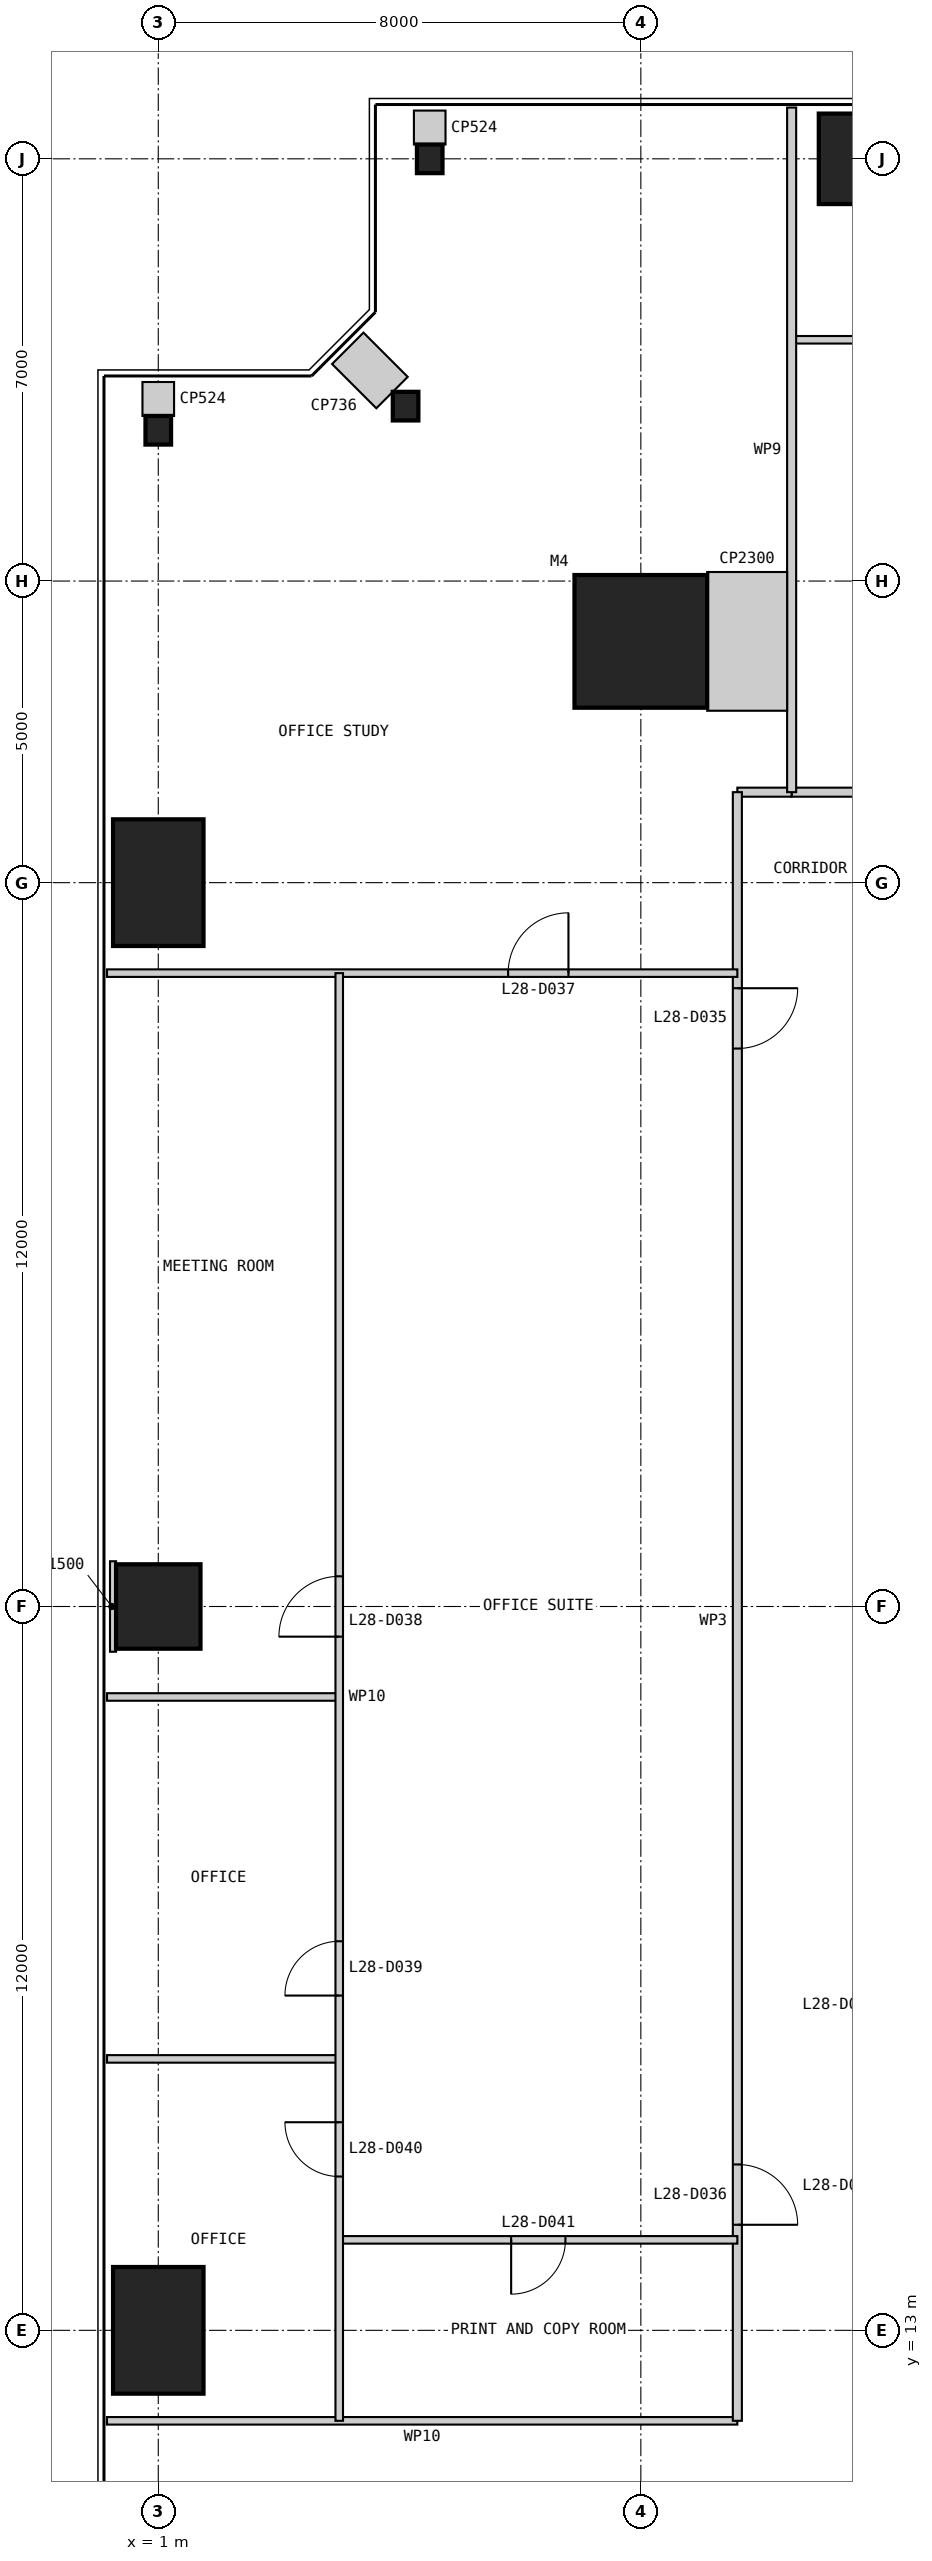
"""IFC4 building model, lengths in metres.
Left out: names, types, materials, properties, quantities, classifications, styles, units other than length and angle.
Written with IfcOpenShell. Run it as: python <this file> out.ifc"""

import sys

from ifc_helpers import new_model, si_unit, direction, frame, frame_2d, origin, origin_2d, place, context, subcontext, project, spatial, rectangle, i_section, extrude, element, fill, save


model = new_model("IFC4")
c1 = context("Model", 3, precision=1e-05, world=origin(), true_north=direction((0.0, 1.0)))
c2 = subcontext(c1, "Body", "Model", "MODEL_VIEW")
j1 = project(units=[si_unit("LENGTHUNIT", "METRE"), si_unit("PLANEANGLEUNIT", "RADIAN")], contexts=[c1])
p1 = place(None, origin())
s1 = spatial("IfcSite", under=j1, at=p1, CompositionType="ELEMENT")
p2 = place(p1, origin())
s2 = spatial("IfcBuilding", under=s1, at=p2, CompositionType="ELEMENT")
p3 = place(p2, frame((0.0, 0.0, 122.4)))
s3 = spatial("IfcBuildingStorey", under=s2, at=p3, CompositionType="ELEMENT", Elevation=122.4)
p4 = place(p3, frame((9.0, 41.0, 0.0), z_axis=(0.0, 0.0, 1.0), x_axis=(1.0, 0.0, 0.0)))
e1 = element("IfcColumn", 1, at=p4, inside=s3, PredefinedType="COLUMN", context=c2, shape_type="SweptSolid", body=[
    extrude(rectangle(XDim=2.2, YDim=2.2, at=origin_2d()), origin(), (0.0, 0.0, 1.0), 4.0),
])
p5 = place(p3, frame((13.0, 49.0, 0.0), z_axis=(0.0, 0.0, 1.0), x_axis=(1.0, 0.0, 0.0)))
e2 = element("IfcColumn", 2, at=p5, inside=s3, PredefinedType="COLUMN", context=c2, shape_type="SweptSolid", body=[
    extrude(rectangle(XDim=2.1, YDim=1.5, at=origin_2d()), origin(), (0.0, 0.0, 1.0), 4.0),
])
for number, where, z_axis, x_axis in (
    (3, (5.5, 49.0, 0.0), (0.0, 0.0, 1.0), (1.0, 0.0, 0.0)),
    (4, (5.1, 44.9, 0.0), (0.0, 0.0, 1.0), (1.0, 0.0, 0.0)),
    (5, (1.0, 44.5, 0.0), (0.0, 0.0, 1.0), (1.0, 0.0, 0.0)),
):
    element("IfcColumn", number, at=place(p3, frame(where, z_axis=z_axis, x_axis=x_axis)), inside=s3, PredefinedType="COLUMN", context=c2, shape_type="SweptSolid", body=[
        extrude(i_section(OverallWidth=0.424, OverallDepth=0.475, WebThickness=0.048, FlangeThickness=0.077, at=origin_2d()), origin(), (0.0, 0.0, 1.0), 4.0),
    ])
p6 = place(p3, frame((1.0, 37.0, 0.0), z_axis=(0.0, 0.0, 1.0), x_axis=(1.0, 0.0, 0.0)))
e6 = element("IfcColumn", 6, at=p6, inside=s3, PredefinedType="COLUMN", context=c2, shape_type="SweptSolid", body=[
    extrude(rectangle(XDim=1.5, YDim=2.1, at=origin_2d()), origin(), (0.0, 0.0, 1.0), 4.0),
])
p7 = place(p3, frame((1.0, 25.0, 0.0), z_axis=(0.0, 0.0, 1.0), x_axis=(1.0, 0.0, 0.0)))
e7 = element("IfcColumn", 7, at=p7, inside=s3, PredefinedType="COLUMN", context=c2, shape_type="SweptSolid", body=[
    extrude(rectangle(XDim=1.4, YDim=1.4, at=origin_2d()), origin(), (0.0, 0.0, 1.0), 4.0),
])
p8 = place(p3, frame((1.0, 13.0, 0.0), z_axis=(0.0, 0.0, 1.0), x_axis=(1.0, 0.0, 0.0)))
e8 = element("IfcColumn", 8, at=p8, inside=s3, PredefinedType="COLUMN", context=c2, shape_type="SweptSolid", body=[
    extrude(rectangle(XDim=1.5, YDim=2.1, at=origin_2d()), origin(), (0.0, 0.0, 1.0), 4.0),
])
p9 = place(p3, frame((0.15, 11.5, 0.0), z_axis=(0.0, 0.0, 1.0), x_axis=(1.0, 0.0, 0.0)))
e9 = element("IfcWall", 9, at=p9, inside=s3, PredefinedType="PARTITIONING", context=c2, shape_type="SweptSolid", body=[
    extrude(rectangle(XDim=10.45, YDim=0.125, at=frame_2d((5.225, 0.0))), origin(), (0.0, 0.0, 1.0), 3.85),
])
p10 = place(p3, frame((38.5, 38.5, 0.0), z_axis=(0.0, 0.0, 1.0), x_axis=(-1.0, 0.0, 0.0)))
e10 = element("IfcWall", 10, at=p10, inside=s3, PredefinedType="PARTITIONING", context=c2, shape_type="SweptSolid", body=[
    extrude(rectangle(XDim=27.0, YDim=0.15, at=frame_2d((13.5, 0.0))), origin(), (0.0, 0.0, 1.0), 3.85),
])
p11 = place(p10, frame((2.5, 0.0, 0.0)))
e11 = element("IfcOpeningElement", 11, at=p11, cuts=e10, PredefinedType="OPENING", context=c2, shape_type="SweptSolid", body=[
    extrude(rectangle(XDim=1.0, YDim=2.2, at=frame_2d((0.5, 1.1))), frame((0.0, 0.085, 0.0), z_axis=(0.0, -1.0, 0.0), x_axis=(1.0, 0.0, 0.0)), (0.0, 0.0, 1.0), 0.17),
])
p12 = place(p10, frame((16.0, 0.0, 0.0)))
e12 = element("IfcOpeningElement", 12, at=p12, cuts=e10, PredefinedType="OPENING", context=c2, shape_type="SweptSolid", body=[
    extrude(rectangle(XDim=1.0, YDim=2.2, at=frame_2d((0.5, 1.1))), frame((0.0, 0.085, 0.0), z_axis=(0.0, -1.0, 0.0), x_axis=(1.0, 0.0, 0.0)), (0.0, 0.0, 1.0), 0.17),
])
p13 = place(p3, frame((17.5, 46.0, 0.0), z_axis=(0.0, 0.0, 1.0), x_axis=(-1.0, 0.0, 0.0)))
e13 = element("IfcWall", 13, at=p13, inside=s3, PredefinedType="PARTITIONING", context=c2, shape_type="SweptSolid", body=[
    extrude(rectangle(XDim=6.0, YDim=0.125, at=frame_2d((3.0, 0.0))), origin(), (0.0, 0.0, 1.0), 3.85),
])
p14 = place(p3, frame((11.5, 38.5, 0.0), z_axis=(0.0, 0.0, 1.0), x_axis=(-1.0, 0.0, 0.0)))
e14 = element("IfcWall", 14, at=p14, inside=s3, PredefinedType="PARTITIONING", context=c2, shape_type="SweptSolid", body=[
    extrude(rectangle(XDim=0.9, YDim=0.15, at=frame_2d((0.45, 0.0))), origin(), (0.0, 0.0, 1.0), 3.85),
])
p15 = place(p3, frame((10.6, 38.5, 0.0), z_axis=(0.0, 0.0, 1.0), x_axis=(0.0, -1.0, 0.0)))
e15 = element("IfcWall", 15, at=p15, inside=s3, PredefinedType="PARTITIONING", context=c2, shape_type="SweptSolid", body=[
    extrude(rectangle(XDim=27.0, YDim=0.15, at=frame_2d((13.5, 0.0))), origin(), (0.0, 0.0, 1.0), 3.85),
])
p16 = place(p15, frame((3.25, 0.0, 0.0)))
e16 = element("IfcOpeningElement", 16, at=p16, cuts=e15, PredefinedType="OPENING", context=c2, shape_type="SweptSolid", body=[
    extrude(rectangle(XDim=1.0, YDim=2.2, at=frame_2d((0.5, 1.1))), frame((0.0, 0.085, 0.0), z_axis=(0.0, -1.0, 0.0), x_axis=(1.0, 0.0, 0.0)), (0.0, 0.0, 1.0), 0.17),
])
p17 = place(p15, frame((22.75, 0.0, 0.0)))
e17 = element("IfcOpeningElement", 17, at=p17, cuts=e15, PredefinedType="OPENING", context=c2, shape_type="SweptSolid", body=[
    extrude(rectangle(XDim=1.0, YDim=2.2, at=frame_2d((0.5, 1.1))), frame((0.0, 0.085, 0.0), z_axis=(0.0, -1.0, 0.0), x_axis=(1.0, 0.0, 0.0)), (0.0, 0.0, 1.0), 0.17),
])
p18 = place(p3, frame((11.5, 49.85, 0.0), z_axis=(0.0, 0.0, 1.0), x_axis=(0.0, -1.0, 0.0)))
e18 = element("IfcWall", 18, at=p18, inside=s3, PredefinedType="PARTITIONING", context=c2, shape_type="SweptSolid", body=[
    extrude(rectangle(XDim=11.35, YDim=0.15, at=frame_2d((5.675, 0.0))), origin(), (0.0, 0.0, 1.0), 3.85),
])
p19 = place(p3, frame((0.15, 35.5, 0.0), z_axis=(0.0, 0.0, 1.0), x_axis=(1.0, 0.0, 0.0)))
e19 = element("IfcWall", 19, at=p19, inside=s3, PredefinedType="PARTITIONING", context=c2, shape_type="SweptSolid", body=[
    extrude(rectangle(XDim=10.45, YDim=0.125, at=frame_2d((5.225, 0.0))), origin(), (0.0, 0.0, 1.0), 3.85),
])
p20 = place(p19, frame((6.65, 0.0, 0.0)))
e20 = element("IfcOpeningElement", 20, at=p20, cuts=e19, PredefinedType="OPENING", context=c2, shape_type="SweptSolid", body=[
    extrude(rectangle(XDim=1.0, YDim=2.2, at=frame_2d((0.5, 1.1))), frame((0.0, 0.073, 0.0), z_axis=(0.0, -1.0, 0.0), x_axis=(1.0, 0.0, 0.0)), (0.0, 0.0, 1.0), 0.145),
])
for number, where, z_axis, x_axis in (
    (21, (0.15, 23.5, 0.0), (0.0, 0.0, 1.0), (1.0, 0.0, 0.0)),
    (22, (0.15, 17.5, 0.0), (0.0, 0.0, 1.0), (1.0, 0.0, 0.0)),
):
    element("IfcWall", number, at=place(p3, frame(where, z_axis=z_axis, x_axis=x_axis)), inside=s3, PredefinedType="PARTITIONING", context=c2, shape_type="SweptSolid", body=[
        extrude(rectangle(XDim=3.85, YDim=0.125, at=frame_2d((1.925, 0.0))), origin(), (0.0, 0.0, 1.0), 3.85),
    ])
p21 = place(p3, frame((4.0, 14.5, 0.0), z_axis=(0.0, 0.0, 1.0), x_axis=(1.0, 0.0, 0.0)))
e23 = element("IfcWall", 23, at=p21, inside=s3, PredefinedType="PARTITIONING", context=c2, shape_type="SweptSolid", body=[
    extrude(rectangle(XDim=6.6, YDim=0.125, at=frame_2d((3.3, 0.0))), origin(), (0.0, 0.0, 1.0), 3.85),
])
p22 = place(p21, frame((2.85, 0.0, 0.0)))
e24 = element("IfcOpeningElement", 24, at=p22, cuts=e23, PredefinedType="OPENING", context=c2, shape_type="SweptSolid", body=[
    extrude(rectangle(XDim=0.9, YDim=2.2, at=frame_2d((0.45, 1.1))), frame((0.0, 0.073, 0.0), z_axis=(0.0, -1.0, 0.0), x_axis=(1.0, 0.0, 0.0)), (0.0, 0.0, 1.0), 0.145),
])
p23 = place(p3, frame((4.0, 35.5, 0.0), z_axis=(0.0, 0.0, 1.0), x_axis=(0.0, -1.0, 0.0)))
e25 = element("IfcWall", 25, at=p23, inside=s3, PredefinedType="PARTITIONING", context=c2, shape_type="SweptSolid", body=[
    extrude(rectangle(XDim=24.0, YDim=0.125, at=frame_2d((12.0, 0.0))), origin(), (0.0, 0.0, 1.0), 3.238),
])
p24 = place(p23, frame((10.0, 0.0, 0.0)))
e26 = element("IfcOpeningElement", 26, at=p24, cuts=e25, PredefinedType="OPENING", context=c2, shape_type="SweptSolid", body=[
    extrude(rectangle(XDim=1.0, YDim=2.2, at=frame_2d((0.5, 1.1))), frame((0.0, 0.073, 0.0), z_axis=(0.0, -1.0, 0.0), x_axis=(1.0, 0.0, 0.0)), (0.0, 0.0, 1.0), 0.145),
])
p25 = place(p23, frame((16.05, 0.0, 0.0)))
e27 = element("IfcOpeningElement", 27, at=p25, cuts=e25, PredefinedType="OPENING", context=c2, shape_type="SweptSolid", body=[
    extrude(rectangle(XDim=0.9, YDim=2.2, at=frame_2d((0.45, 1.1))), frame((0.0, 0.073, 0.0), z_axis=(0.0, -1.0, 0.0), x_axis=(1.0, 0.0, 0.0)), (0.0, 0.0, 1.0), 0.145),
])
p26 = place(p23, frame((19.05, 0.0, 0.0)))
e28 = element("IfcOpeningElement", 28, at=p26, cuts=e25, PredefinedType="OPENING", context=c2, shape_type="SweptSolid", body=[
    extrude(rectangle(XDim=0.9, YDim=2.2, at=frame_2d((0.45, 1.1))), frame((0.0, 0.073, 0.0), z_axis=(0.0, -1.0, 0.0), x_axis=(1.0, 0.0, 0.0)), (0.0, 0.0, 1.0), 0.145),
])
p27 = place(p3, frame((11.425, 41.0, 0.0), z_axis=(0.0, 0.0, 1.0), x_axis=(-1.0, 0.0, 0.0)))
e29 = element("IfcWall", 29, at=p27, inside=s3, PredefinedType="PARTITIONING", context=c2, shape_type="SweptSolid", body=[
    extrude(rectangle(XDim=1.325, YDim=2.3, at=frame_2d((0.663, 0.0))), origin(), (0.0, 0.0, 1.0), 3.85),
])
p28 = place(p3, frame((5.5, 49.8, 0.0), z_axis=(0.0, 0.0, 1.0), x_axis=(0.0, -1.0, 0.0)))
e30 = element("IfcWall", 30, at=p28, inside=s3, PredefinedType="PARTITIONING", context=c2, shape_type="SweptSolid", body=[
    extrude(rectangle(XDim=0.562, YDim=0.524, at=frame_2d((0.281, 0.0))), origin(), (0.0, 0.0, 1.0), 3.85),
])
p29 = place(p3, frame((4.141, 45.859, 0.0), z_axis=(0.0, 0.0, 1.0), x_axis=(0.707106781187, -0.707106781187, 0.0)))
e31 = element("IfcWall", 31, at=p29, inside=s3, PredefinedType="PARTITIONING", context=c2, shape_type="SweptSolid", body=[
    extrude(rectangle(XDim=1.038, YDim=0.736, at=frame_2d((0.519, 0.0))), origin(), (0.0, 0.0, 1.0), 3.85),
])
p30 = place(p3, frame((1.0, 45.3, 0.0), z_axis=(0.0, 0.0, 1.0), x_axis=(0.0, -1.0, 0.0)))
e32 = element("IfcWall", 32, at=p30, inside=s3, PredefinedType="PARTITIONING", context=c2, shape_type="SweptSolid", body=[
    extrude(rectangle(XDim=0.562, YDim=0.524, at=frame_2d((0.281, 0.0))), origin(), (0.0, 0.0, 1.0), 3.85),
])
p31 = place(p3, frame((0.2, 25.0, 0.0), z_axis=(0.0, 0.0, 1.0), x_axis=(1.0, 0.0, 0.0)))
e33 = element("IfcWall", 33, at=p31, inside=s3, PredefinedType="PARTITIONING", context=c2, shape_type="SweptSolid", body=[
    extrude(rectangle(XDim=0.1, YDim=1.5, at=frame_2d((0.05, 0.0))), origin(), (0.0, 0.0, 1.0), 3.85),
])
p32 = place(p16, origin())
e34 = element("IfcDoor", 34, at=p32, inside=s3, OperationType="SINGLE_SWING_LEFT", PredefinedType="DOOR", context=c2, shape_type="SweptSolid", body=[
    extrude(rectangle(XDim=1.0, YDim=2.2, at=frame_2d((0.5, 1.1))), frame((0.0, 0.025, 0.0), z_axis=(0.0, -1.0, 0.0), x_axis=(1.0, 0.0, 0.0)), (0.0, 0.0, 1.0), 0.05),
])
fill(e16, e34)
p33 = place(p17, origin())
e35 = element("IfcDoor", 35, at=p33, inside=s3, OperationType="SINGLE_SWING_RIGHT", PredefinedType="DOOR", context=c2, shape_type="SweptSolid", body=[
    extrude(rectangle(XDim=1.0, YDim=2.2, at=frame_2d((0.5, 1.1))), frame((0.0, 0.025, 0.0), z_axis=(0.0, -1.0, 0.0), x_axis=(1.0, 0.0, 0.0)), (0.0, 0.0, 1.0), 0.05),
])
fill(e17, e35)
p34 = place(p20, origin())
e36 = element("IfcDoor", 36, at=p34, inside=s3, OperationType="SINGLE_SWING_RIGHT", PredefinedType="DOOR", context=c2, shape_type="SweptSolid", body=[
    extrude(rectangle(XDim=1.0, YDim=2.2, at=frame_2d((0.5, 1.1))), frame((0.0, 0.025, 0.0), z_axis=(0.0, -1.0, 0.0), x_axis=(1.0, 0.0, 0.0)), (0.0, 0.0, 1.0), 0.05),
])
fill(e20, e36)
p35 = place(p24, frame((1.0, 0.0, 0.0), z_axis=(0.0, 0.0, 1.0), x_axis=(-1.0, 0.0, 0.0)))
e37 = element("IfcDoor", 37, at=p35, inside=s3, OperationType="SINGLE_SWING_LEFT", PredefinedType="DOOR", context=c2, shape_type="SweptSolid", body=[
    extrude(rectangle(XDim=1.0, YDim=2.2, at=frame_2d((0.5, 1.1))), frame((0.0, 0.025, 0.0), z_axis=(0.0, -1.0, 0.0), x_axis=(1.0, 0.0, 0.0)), (0.0, 0.0, 1.0), 0.05),
])
fill(e26, e37)
p36 = place(p25, frame((0.9, 0.0, 0.0), z_axis=(0.0, 0.0, 1.0), x_axis=(-1.0, 0.0, 0.0)))
e38 = element("IfcDoor", 38, at=p36, inside=s3, OperationType="SINGLE_SWING_LEFT", PredefinedType="DOOR", context=c2, shape_type="SweptSolid", body=[
    extrude(rectangle(XDim=0.9, YDim=2.2, at=frame_2d((0.45, 1.1))), frame((0.0, 0.025, 0.0), z_axis=(0.0, -1.0, 0.0), x_axis=(1.0, 0.0, 0.0)), (0.0, 0.0, 1.0), 0.05),
])
fill(e27, e38)
p37 = place(p26, frame((0.9, 0.0, 0.0), z_axis=(0.0, 0.0, 1.0), x_axis=(-1.0, 0.0, 0.0)))
e39 = element("IfcDoor", 39, at=p37, inside=s3, OperationType="SINGLE_SWING_RIGHT", PredefinedType="DOOR", context=c2, shape_type="SweptSolid", body=[
    extrude(rectangle(XDim=0.9, YDim=2.2, at=frame_2d((0.45, 1.1))), frame((0.0, 0.025, 0.0), z_axis=(0.0, -1.0, 0.0), x_axis=(1.0, 0.0, 0.0)), (0.0, 0.0, 1.0), 0.05),
])
fill(e28, e39)
p38 = place(p22, frame((0.9, 0.0, 0.0), z_axis=(0.0, 0.0, 1.0), x_axis=(-1.0, 0.0, 0.0)))
e40 = element("IfcDoor", 40, at=p38, inside=s3, OperationType="SINGLE_SWING_RIGHT", PredefinedType="DOOR", context=c2, shape_type="SweptSolid", body=[
    extrude(rectangle(XDim=0.9, YDim=2.2, at=frame_2d((0.45, 1.1))), frame((0.0, 0.025, 0.0), z_axis=(0.0, -1.0, 0.0), x_axis=(1.0, 0.0, 0.0)), (0.0, 0.0, 1.0), 0.05),
])
fill(e24, e40)
save(model, sys.argv[1])
